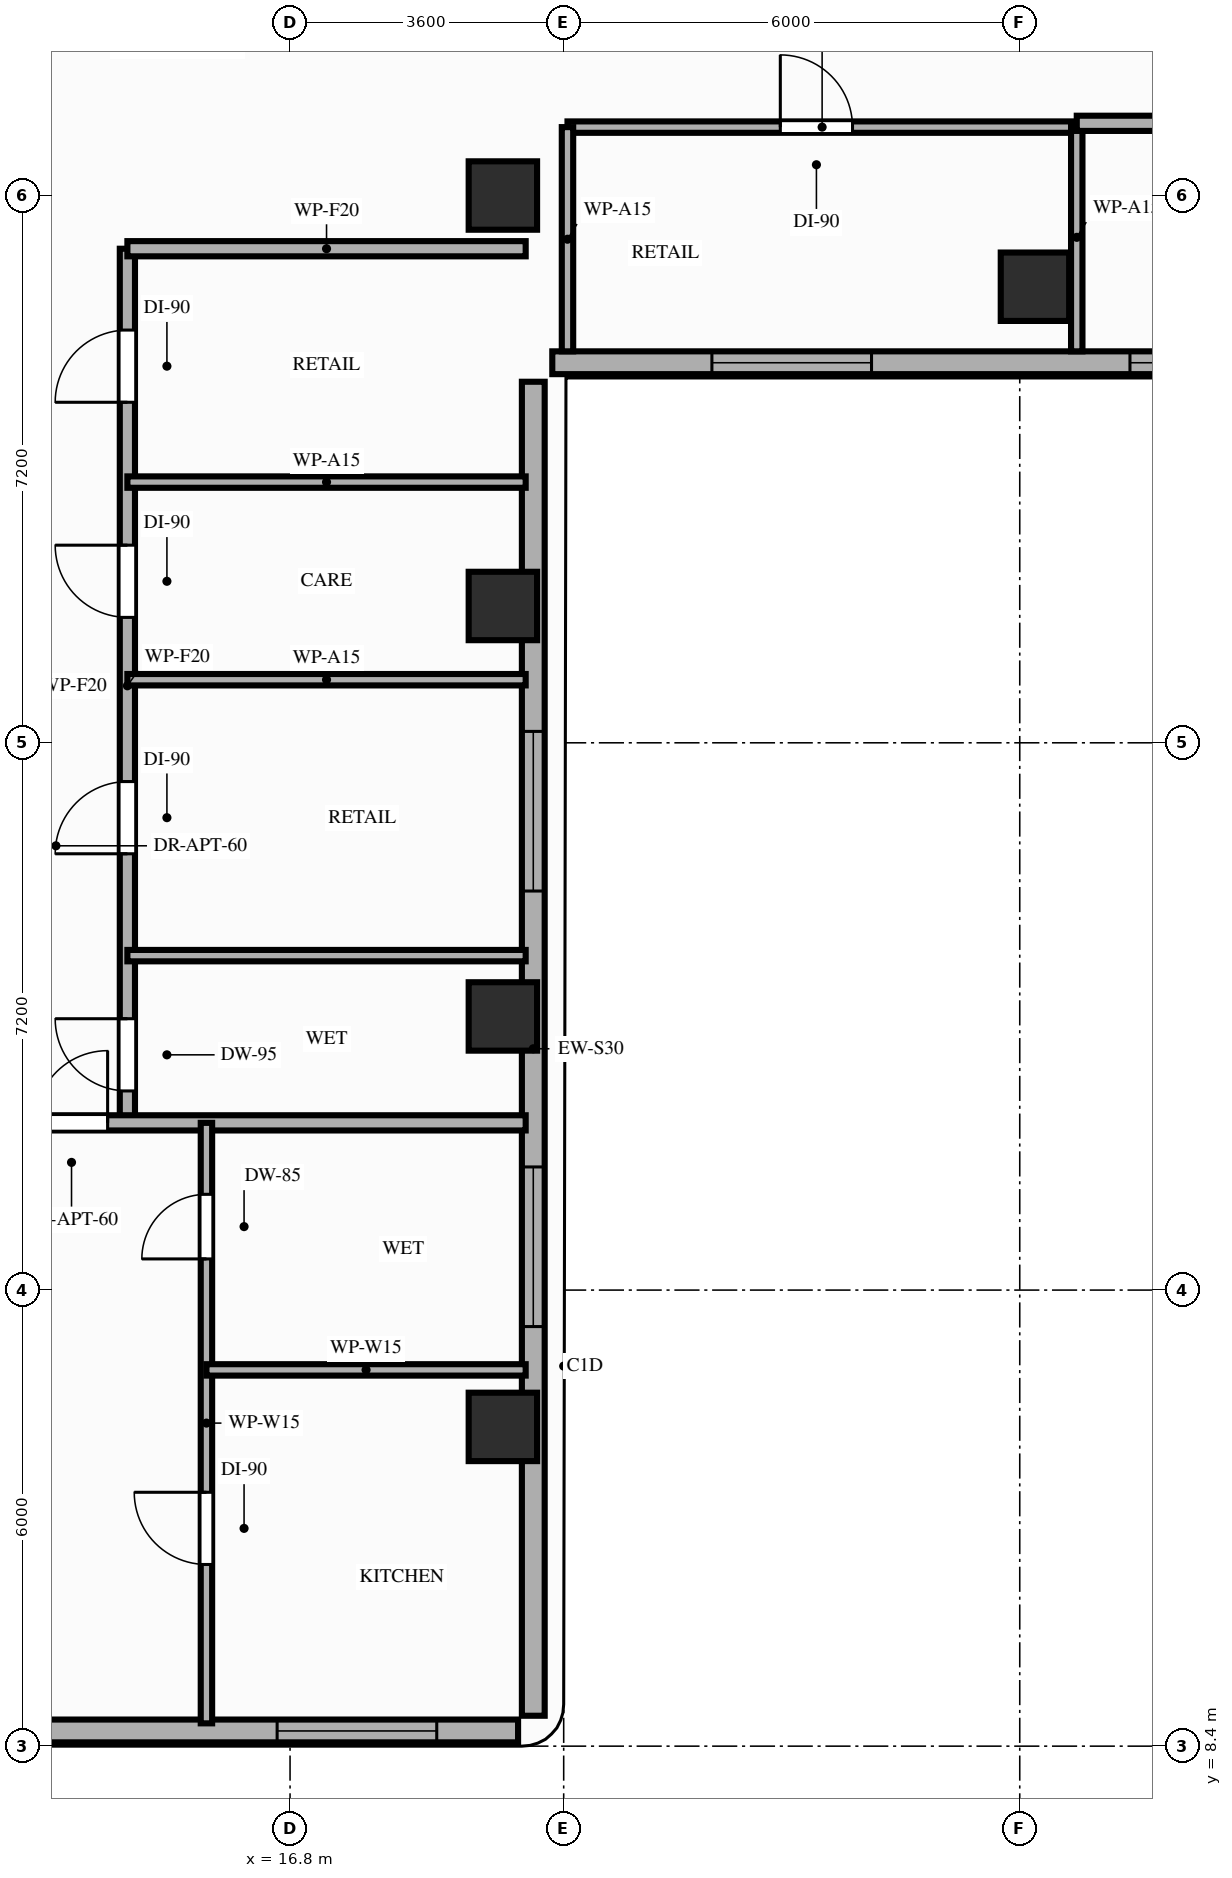
"""IFC4 building model, lengths in metres.
Left out: names, types, materials, properties, quantities, classifications, styles, units other than length and angle.
Written with IfcOpenShell. Run it as: python <this file> out.ifc"""

import sys

from ifc_helpers import new_model, si_unit, direction, frame, frame_2d, origin, origin_2d, place, context, subcontext, project, spatial, rectangle, extrude, element, fill, save


model = new_model("IFC4")
c1 = context("Model", 3, precision=1e-05, world=origin(), true_north=direction((0.0, 1.0)))
c2 = subcontext(c1, "Body", "Model", "MODEL_VIEW")
j1 = project(units=[si_unit("LENGTHUNIT", "METRE"), si_unit("PLANEANGLEUNIT", "RADIAN")], contexts=[c1])
p1 = place(None, origin())
s1 = spatial("IfcSite", under=j1, at=p1, CompositionType="ELEMENT")
p2 = place(p1, origin())
s2 = spatial("IfcBuilding", under=s1, at=p2, CompositionType="ELEMENT")
p3 = place(p2, frame((0.0, 0.0, 176.0)))
s3 = spatial("IfcBuildingStorey", under=s2, at=p3, CompositionType="ELEMENT", Elevation=176.0)
for number, where, z_axis, x_axis in (
    (1, (19.6, 12.6, 0.0), (0.0, 0.0, 1.0), (1.0, 0.0, 0.0)),
    (2, (19.6, 18.0, 0.0), (0.0, 0.0, 1.0), (1.0, 0.0, 0.0)),
    (3, (19.6, 23.4, 0.0), (0.0, 0.0, 1.0), (1.0, 0.0, 0.0)),
    (4, (19.6, 28.8, 0.0), (0.0, 0.0, 1.0), (1.0, 0.0, 0.0)),
    (5, (26.6, 27.6, 0.0), (0.0, 0.0, 1.0), (1.0, 0.0, 0.0)),
):
    element("IfcColumn", number, at=place(p3, frame(where, z_axis=z_axis, x_axis=x_axis)), inside=s3, PredefinedType="COLUMN", context=c2, shape_type="SweptSolid", body=[
        extrude(rectangle(XDim=0.9, YDim=0.9, at=origin_2d()), origin(), (0.0, 0.0, 1.0), 3.2),
    ])
p4 = place(p3, frame((4.0, 8.6, 0.0), z_axis=(0.0, 0.0, 1.0), x_axis=(1.0, 0.0, 0.0)))
e6 = element("IfcWall", 6, at=p4, inside=s3, PredefinedType="STANDARD", context=c2, shape_type="SweptSolid", body=[
    extrude(rectangle(XDim=15.8, YDim=0.3, at=frame_2d((7.9, 0.0))), origin(), (0.0, 0.0, 1.0), 3.02),
])
p5 = place(p4, frame((6.65, 0.0, 0.85)))
e7 = element("IfcOpeningElement", 7, at=p5, cuts=e6, PredefinedType="OPENING", context=c2, shape_type="SweptSolid", body=[
    extrude(rectangle(XDim=2.1, YDim=1.8, at=frame_2d((1.05, 0.9))), frame((0.0, 0.16, 0.0), z_axis=(0.0, -1.0, 0.0), x_axis=(1.0, 0.0, 0.0)), (0.0, 0.0, 1.0), 0.32),
])
p6 = place(p4, frame((12.63, 0.0, 0.85)))
e8 = element("IfcOpeningElement", 8, at=p6, cuts=e6, PredefinedType="OPENING", context=c2, shape_type="SweptSolid", body=[
    extrude(rectangle(XDim=2.1, YDim=1.8, at=frame_2d((1.05, 0.9))), frame((0.0, 0.16, 0.0), z_axis=(0.0, -1.0, 0.0), x_axis=(1.0, 0.0, 0.0)), (0.0, 0.0, 1.0), 0.32),
])
p7 = place(p3, frame((20.0, 8.8, 0.0), z_axis=(0.0, 0.0, 1.0), x_axis=(0.0, 1.0, 0.0)))
e9 = element("IfcWall", 9, at=p7, inside=s3, PredefinedType="STANDARD", context=c2, shape_type="SweptSolid", body=[
    extrude(rectangle(XDim=17.55, YDim=0.3, at=frame_2d((8.775, 0.0))), origin(), (0.0, 0.0, 1.0), 2.46),
])
p8 = place(p7, frame((5.12, 0.0, 0.85)))
e10 = element("IfcOpeningElement", 10, at=p8, cuts=e9, PredefinedType="OPENING", context=c2, shape_type="SweptSolid", body=[
    extrude(rectangle(XDim=2.1, YDim=1.36, at=frame_2d((1.05, 0.68))), frame((0.0, 0.16, 0.0), z_axis=(0.0, -1.0, 0.0), x_axis=(1.0, 0.0, 0.0)), (0.0, 0.0, 1.0), 0.32),
])
p9 = place(p7, frame((10.85, 0.0, 0.85)))
e11 = element("IfcOpeningElement", 11, at=p9, cuts=e9, PredefinedType="OPENING", context=c2, shape_type="SweptSolid", body=[
    extrude(rectangle(XDim=2.1, YDim=1.36, at=frame_2d((1.05, 0.68))), frame((0.0, 0.16, 0.0), z_axis=(0.0, -1.0, 0.0), x_axis=(1.0, 0.0, 0.0)), (0.0, 0.0, 1.0), 0.32),
])
p10 = place(p3, frame((20.25, 26.6, 0.0), z_axis=(0.0, 0.0, 1.0), x_axis=(1.0, 0.0, 0.0)))
e12 = element("IfcWall", 12, at=p10, inside=s3, PredefinedType="STANDARD", context=c2, shape_type="SweptSolid", body=[
    extrude(rectangle(XDim=21.35, YDim=0.3, at=frame_2d((10.675, 0.0))), origin(), (0.0, 0.0, 1.0), 2.71),
])
p11 = place(p10, frame((13.9, 0.0, 0.0)))
e13 = element("IfcOpeningElement", 13, at=p11, cuts=e12, PredefinedType="OPENING", context=c2, shape_type="SweptSolid", body=[
    extrude(rectangle(XDim=1.3, YDim=2.08, at=frame_2d((0.65, 1.04))), frame((0.0, 0.16, 0.0), z_axis=(0.0, -1.0, 0.0), x_axis=(1.0, 0.0, 0.0)), (0.0, 0.0, 1.0), 0.32),
])
p12 = place(p10, frame((2.1, 0.0, 0.85)))
e14 = element("IfcOpeningElement", 14, at=p12, cuts=e12, PredefinedType="OPENING", context=c2, shape_type="SweptSolid", body=[
    extrude(rectangle(XDim=2.1, YDim=1.61, at=frame_2d((1.05, 0.805))), frame((0.0, 0.16, 0.0), z_axis=(0.0, -1.0, 0.0), x_axis=(1.0, 0.0, 0.0)), (0.0, 0.0, 1.0), 0.32),
])
p13 = place(p10, frame((7.6, 0.0, 0.85)))
e15 = element("IfcOpeningElement", 15, at=p13, cuts=e12, PredefinedType="OPENING", context=c2, shape_type="SweptSolid", body=[
    extrude(rectangle(XDim=2.1, YDim=1.61, at=frame_2d((1.05, 0.805))), frame((0.0, 0.16, 0.0), z_axis=(0.0, -1.0, 0.0), x_axis=(1.0, 0.0, 0.0)), (0.0, 0.0, 1.0), 0.32),
])
p14 = place(p3, frame((14.66, 16.6, 0.0), z_axis=(0.0, 0.0, 1.0), x_axis=(0.0, 1.0, 0.0)))
e16 = element("IfcWall", 16, at=p14, inside=s3, PredefinedType="PARTITIONING", context=c2, shape_type="SweptSolid", body=[
    extrude(rectangle(XDim=11.5, YDim=0.2, at=frame_2d((5.75, 0.0))), origin(), (0.0, 0.0, 1.0), 2.46),
])
p15 = place(p14, frame((0.42, 0.0, 0.0)))
e17 = element("IfcOpeningElement", 17, at=p15, cuts=e16, PredefinedType="OPENING", context=c2, shape_type="SweptSolid", body=[
    extrude(rectangle(XDim=0.95, YDim=2.1, at=frame_2d((0.475, 1.05))), frame((0.0, 0.11, 0.0), z_axis=(0.0, -1.0, 0.0), x_axis=(1.0, 0.0, 0.0)), (0.0, 0.0, 1.0), 0.22),
])
p16 = place(p14, frame((3.54, 0.0, 0.0)))
e18 = element("IfcOpeningElement", 18, at=p16, cuts=e16, PredefinedType="OPENING", context=c2, shape_type="SweptSolid", body=[
    extrude(rectangle(XDim=0.95, YDim=2.15, at=frame_2d((0.475, 1.075))), frame((0.0, 0.11, 0.0), z_axis=(0.0, -1.0, 0.0), x_axis=(1.0, 0.0, 0.0)), (0.0, 0.0, 1.0), 0.22),
])
p17 = place(p14, frame((6.65, 0.0, 0.0)))
e19 = element("IfcOpeningElement", 19, at=p17, cuts=e16, PredefinedType="OPENING", context=c2, shape_type="SweptSolid", body=[
    extrude(rectangle(XDim=0.95, YDim=2.15, at=frame_2d((0.475, 1.075))), frame((0.0, 0.11, 0.0), z_axis=(0.0, -1.0, 0.0), x_axis=(1.0, 0.0, 0.0)), (0.0, 0.0, 1.0), 0.22),
])
p18 = place(p14, frame((9.48, 0.0, 0.0)))
e20 = element("IfcOpeningElement", 20, at=p18, cuts=e16, PredefinedType="OPENING", context=c2, shape_type="SweptSolid", body=[
    extrude(rectangle(XDim=0.95, YDim=2.15, at=frame_2d((0.475, 1.075))), frame((0.0, 0.11, 0.0), z_axis=(0.0, -1.0, 0.0), x_axis=(1.0, 0.0, 0.0)), (0.0, 0.0, 1.0), 0.22),
])
p19 = place(p3, frame((3.9, 16.6, 0.0), z_axis=(0.0, 0.0, 1.0), x_axis=(1.0, 0.0, 0.0)))
e21 = element("IfcWall", 21, at=p19, inside=s3, PredefinedType="PARTITIONING", context=c2, shape_type="SweptSolid", body=[
    extrude(rectangle(XDim=16.0, YDim=0.2, at=frame_2d((8.0, 0.0))), origin(), (0.0, 0.0, 1.0), 2.46),
])
p20 = place(p19, frame((9.55, 0.0, 0.0)))
e22 = element("IfcOpeningElement", 22, at=p20, cuts=e21, PredefinedType="OPENING", context=c2, shape_type="SweptSolid", body=[
    extrude(rectangle(XDim=0.95, YDim=2.15, at=frame_2d((0.475, 1.075))), frame((0.0, 0.11, 0.0), z_axis=(0.0, -1.0, 0.0), x_axis=(1.0, 0.0, 0.0)), (0.0, 0.0, 1.0), 0.22),
])
p21 = place(p3, frame((14.66, 28.1, 0.0), z_axis=(0.0, 0.0, 1.0), x_axis=(1.0, 0.0, 0.0)))
e23 = element("IfcWall", 23, at=p21, inside=s3, PredefinedType="PARTITIONING", context=c2, shape_type="SweptSolid", body=[
    extrude(rectangle(XDim=5.24, YDim=0.2, at=frame_2d((2.62, 0.0))), origin(), (0.0, 0.0, 1.0), 2.46),
])
p22 = place(p3, frame((20.45, 29.7, 0.0), z_axis=(0.0, 0.0, 1.0), x_axis=(1.0, 0.0, 0.0)))
e24 = element("IfcWall", 24, at=p22, inside=s3, PredefinedType="PARTITIONING", context=c2, shape_type="SweptSolid", body=[
    extrude(rectangle(XDim=6.7, YDim=0.15, at=frame_2d((3.35, 0.0))), origin(), (0.0, 0.0, 1.0), 3.02),
])
p23 = place(p22, frame((2.8, 0.0, 0.0)))
e25 = element("IfcOpeningElement", 25, at=p23, cuts=e24, PredefinedType="OPENING", context=c2, shape_type="SweptSolid", body=[
    extrude(rectangle(XDim=0.95, YDim=2.15, at=frame_2d((0.475, 1.075))), frame((0.0, 0.085, 0.0), z_axis=(0.0, -1.0, 0.0), x_axis=(1.0, 0.0, 0.0)), (0.0, 0.0, 1.0), 0.17),
])
p24 = place(p3, frame((20.45, 26.75, 0.0), z_axis=(0.0, 0.0, 1.0), x_axis=(0.0, 1.0, 0.0)))
e26 = element("IfcWall", 26, at=p24, inside=s3, PredefinedType="PARTITIONING", context=c2, shape_type="SweptSolid", body=[
    extrude(rectangle(XDim=2.95, YDim=0.15, at=frame_2d((1.475, 0.0))), origin(), (0.0, 0.0, 1.0), 2.46),
])
p25 = place(p3, frame((27.15, 26.75, 0.0), z_axis=(0.0, 0.0, 1.0), x_axis=(0.0, 1.0, 0.0)))
e27 = element("IfcWall", 27, at=p25, inside=s3, PredefinedType="PARTITIONING", context=c2, shape_type="SweptSolid", body=[
    extrude(rectangle(XDim=3.0, YDim=0.15, at=frame_2d((1.5, 0.0))), origin(), (0.0, 0.0, 1.0), 2.46),
])
p26 = place(p3, frame((15.7, 8.7, 0.0), z_axis=(0.0, 0.0, 1.0), x_axis=(0.0, 1.0, 0.0)))
e28 = element("IfcWall", 28, at=p26, inside=s3, PredefinedType="PARTITIONING", context=c2, shape_type="SweptSolid", body=[
    extrude(rectangle(XDim=7.9, YDim=0.15, at=frame_2d((3.95, 0.0))), origin(), (0.0, 0.0, 1.0), 2.46),
])
p27 = place(p26, frame((2.09, 0.0, 0.0)))
e29 = element("IfcOpeningElement", 29, at=p27, cuts=e28, PredefinedType="OPENING", context=c2, shape_type="SweptSolid", body=[
    extrude(rectangle(XDim=0.95, YDim=2.15, at=frame_2d((0.475, 1.075))), frame((0.0, 0.085, 0.0), z_axis=(0.0, -1.0, 0.0), x_axis=(1.0, 0.0, 0.0)), (0.0, 0.0, 1.0), 0.17),
])
p28 = place(p26, frame((6.11, 0.0, 0.0)))
e30 = element("IfcOpeningElement", 30, at=p28, cuts=e28, PredefinedType="OPENING", context=c2, shape_type="SweptSolid", body=[
    extrude(rectangle(XDim=0.85, YDim=2.1, at=frame_2d((0.425, 1.05))), frame((0.0, 0.085, 0.0), z_axis=(0.0, -1.0, 0.0), x_axis=(1.0, 0.0, 0.0)), (0.0, 0.0, 1.0), 0.17),
])
p29 = place(p3, frame((15.7, 13.35, 0.0), z_axis=(0.0, 0.0, 1.0), x_axis=(1.0, 0.0, 0.0)))
e31 = element("IfcWall", 31, at=p29, inside=s3, PredefinedType="PARTITIONING", context=c2, shape_type="SweptSolid", body=[
    extrude(rectangle(XDim=4.2, YDim=0.15, at=frame_2d((2.1, 0.0))), origin(), (0.0, 0.0, 1.0), 2.46),
])
for number, where, z_axis, x_axis in (
    (32, (14.66, 18.8, 0.0), (0.0, 0.0, 1.0), (1.0, 0.0, 0.0)),
    (33, (14.66, 22.43, 0.0), (0.0, 0.0, 1.0), (1.0, 0.0, 0.0)),
    (34, (14.66, 25.03, 0.0), (0.0, 0.0, 1.0), (1.0, 0.0, 0.0)),
):
    element("IfcWall", number, at=place(p3, frame(where, z_axis=z_axis, x_axis=x_axis)), inside=s3, PredefinedType="PARTITIONING", context=c2, shape_type="SweptSolid", body=[
        extrude(rectangle(XDim=5.24, YDim=0.15, at=frame_2d((2.62, 0.0))), origin(), (0.0, 0.0, 1.0), 2.46),
    ])
p30 = place(p3, frame((27.15, 29.75, 0.0), z_axis=(0.0, 0.0, 1.0), x_axis=(1.0, 0.0, 0.0)))
e35 = element("IfcWall", 35, at=p30, inside=s3, PredefinedType="PARTITIONING", context=c2, shape_type="SweptSolid", body=[
    extrude(rectangle(XDim=6.25, YDim=0.2, at=frame_2d((3.125, 0.0))), origin(), (0.0, 0.0, 1.0), 2.46),
])
p31 = place(p30, frame((1.49, 0.0, 0.0)))
e36 = element("IfcOpeningElement", 36, at=p31, cuts=e35, PredefinedType="OPENING", context=c2, shape_type="SweptSolid", body=[
    extrude(rectangle(XDim=0.95, YDim=2.15, at=frame_2d((0.475, 1.075))), frame((0.0, 0.11, 0.0), z_axis=(0.0, -1.0, 0.0), x_axis=(1.0, 0.0, 0.0)), (0.0, 0.0, 1.0), 0.22),
])
p32 = place(p30, frame((4.61, 0.0, 0.0)))
e37 = element("IfcOpeningElement", 37, at=p32, cuts=e35, PredefinedType="OPENING", context=c2, shape_type="SweptSolid", body=[
    extrude(rectangle(XDim=0.95, YDim=2.15, at=frame_2d((0.475, 1.075))), frame((0.0, 0.11, 0.0), z_axis=(0.0, -1.0, 0.0), x_axis=(1.0, 0.0, 0.0)), (0.0, 0.0, 1.0), 0.22),
])
p33 = place(p6, origin())
e38 = element("IfcWindow", 38, at=p33, inside=s3, PartitioningType="SINGLE_PANEL", PredefinedType="WINDOW", context=c2, shape_type="SweptSolid", body=[
    extrude(rectangle(XDim=2.1, YDim=1.8, at=frame_2d((1.05, 0.9))), frame((0.0, 0.03, 0.0), z_axis=(0.0, -1.0, 0.0), x_axis=(1.0, 0.0, 0.0)), (0.0, 0.0, 1.0), 0.06),
])
fill(e8, e38)
p34 = place(p8, origin())
e39 = element("IfcWindow", 39, at=p34, inside=s3, PartitioningType="SINGLE_PANEL", PredefinedType="WINDOW", context=c2, shape_type="SweptSolid", body=[
    extrude(rectangle(XDim=2.1, YDim=1.36, at=frame_2d((1.05, 0.68))), frame((0.0, 0.03, 0.0), z_axis=(0.0, -1.0, 0.0), x_axis=(1.0, 0.0, 0.0)), (0.0, 0.0, 1.0), 0.06),
])
fill(e10, e39)
p35 = place(p9, origin())
e40 = element("IfcWindow", 40, at=p35, inside=s3, PartitioningType="SINGLE_PANEL", PredefinedType="WINDOW", context=c2, shape_type="SweptSolid", body=[
    extrude(rectangle(XDim=2.1, YDim=1.36, at=frame_2d((1.05, 0.68))), frame((0.0, 0.03, 0.0), z_axis=(0.0, -1.0, 0.0), x_axis=(1.0, 0.0, 0.0)), (0.0, 0.0, 1.0), 0.06),
])
fill(e11, e40)
p36 = place(p12, origin())
e41 = element("IfcWindow", 41, at=p36, inside=s3, PartitioningType="SINGLE_PANEL", PredefinedType="WINDOW", context=c2, shape_type="SweptSolid", body=[
    extrude(rectangle(XDim=2.1, YDim=1.61, at=frame_2d((1.05, 0.805))), frame((0.0, 0.03, 0.0), z_axis=(0.0, -1.0, 0.0), x_axis=(1.0, 0.0, 0.0)), (0.0, 0.0, 1.0), 0.06),
])
fill(e14, e41)
p37 = place(p13, origin())
e42 = element("IfcWindow", 42, at=p37, inside=s3, PartitioningType="SINGLE_PANEL", PredefinedType="WINDOW", context=c2, shape_type="SweptSolid", body=[
    extrude(rectangle(XDim=2.1, YDim=1.61, at=frame_2d((1.05, 0.805))), frame((0.0, 0.03, 0.0), z_axis=(0.0, -1.0, 0.0), x_axis=(1.0, 0.0, 0.0)), (0.0, 0.0, 1.0), 0.06),
])
fill(e15, e42)
p38 = place(p23, origin())
e43 = element("IfcDoor", 43, at=p38, inside=s3, OperationType="SINGLE_SWING_LEFT", PredefinedType="DOOR", context=c2, shape_type="SweptSolid", body=[
    extrude(rectangle(XDim=0.95, YDim=2.15, at=frame_2d((0.475, 1.075))), frame((0.0, 0.025, 0.0), z_axis=(0.0, -1.0, 0.0), x_axis=(1.0, 0.0, 0.0)), (0.0, 0.0, 1.0), 0.05),
])
fill(e25, e43)
p39 = place(p20, origin())
e44 = element("IfcDoor", 44, at=p39, inside=s3, OperationType="SINGLE_SWING_RIGHT", PredefinedType="DOOR", context=c2, shape_type="SweptSolid", body=[
    extrude(rectangle(XDim=0.95, YDim=2.15, at=frame_2d((0.475, 1.075))), frame((0.0, 0.025, 0.0), z_axis=(0.0, -1.0, 0.0), x_axis=(1.0, 0.0, 0.0)), (0.0, 0.0, 1.0), 0.05),
])
fill(e22, e44)
p40 = place(p27, origin())
e45 = element("IfcDoor", 45, at=p40, inside=s3, OperationType="SINGLE_SWING_RIGHT", PredefinedType="DOOR", context=c2, shape_type="SweptSolid", body=[
    extrude(rectangle(XDim=0.95, YDim=2.15, at=frame_2d((0.475, 1.075))), frame((0.0, 0.025, 0.0), z_axis=(0.0, -1.0, 0.0), x_axis=(1.0, 0.0, 0.0)), (0.0, 0.0, 1.0), 0.05),
])
fill(e29, e45)
p41 = place(p28, origin())
e46 = element("IfcDoor", 46, at=p41, inside=s3, OperationType="SINGLE_SWING_LEFT", PredefinedType="DOOR", context=c2, shape_type="SweptSolid", body=[
    extrude(rectangle(XDim=0.85, YDim=2.1, at=frame_2d((0.425, 1.05))), frame((0.0, 0.025, 0.0), z_axis=(0.0, -1.0, 0.0), x_axis=(1.0, 0.0, 0.0)), (0.0, 0.0, 1.0), 0.05),
])
fill(e30, e46)
p42 = place(p15, origin())
e47 = element("IfcDoor", 47, at=p42, inside=s3, OperationType="SINGLE_SWING_RIGHT", PredefinedType="DOOR", context=c2, shape_type="SweptSolid", body=[
    extrude(rectangle(XDim=0.95, YDim=2.1, at=frame_2d((0.475, 1.05))), frame((0.0, 0.025, 0.0), z_axis=(0.0, -1.0, 0.0), x_axis=(1.0, 0.0, 0.0)), (0.0, 0.0, 1.0), 0.05),
])
fill(e17, e47)
p43 = place(p16, origin())
e48 = element("IfcDoor", 48, at=p43, inside=s3, OperationType="SINGLE_SWING_LEFT", PredefinedType="DOOR", context=c2, shape_type="SweptSolid", body=[
    extrude(rectangle(XDim=0.95, YDim=2.15, at=frame_2d((0.475, 1.075))), frame((0.0, 0.025, 0.0), z_axis=(0.0, -1.0, 0.0), x_axis=(1.0, 0.0, 0.0)), (0.0, 0.0, 1.0), 0.05),
])
fill(e18, e48)
p44 = place(p17, origin())
e49 = element("IfcDoor", 49, at=p44, inside=s3, OperationType="SINGLE_SWING_RIGHT", PredefinedType="DOOR", context=c2, shape_type="SweptSolid", body=[
    extrude(rectangle(XDim=0.95, YDim=2.15, at=frame_2d((0.475, 1.075))), frame((0.0, 0.025, 0.0), z_axis=(0.0, -1.0, 0.0), x_axis=(1.0, 0.0, 0.0)), (0.0, 0.0, 1.0), 0.05),
])
fill(e19, e49)
p45 = place(p18, origin())
e50 = element("IfcDoor", 50, at=p45, inside=s3, OperationType="SINGLE_SWING_LEFT", PredefinedType="DOOR", context=c2, shape_type="SweptSolid", body=[
    extrude(rectangle(XDim=0.95, YDim=2.15, at=frame_2d((0.475, 1.075))), frame((0.0, 0.025, 0.0), z_axis=(0.0, -1.0, 0.0), x_axis=(1.0, 0.0, 0.0)), (0.0, 0.0, 1.0), 0.05),
])
fill(e20, e50)
save(model, sys.argv[1])
